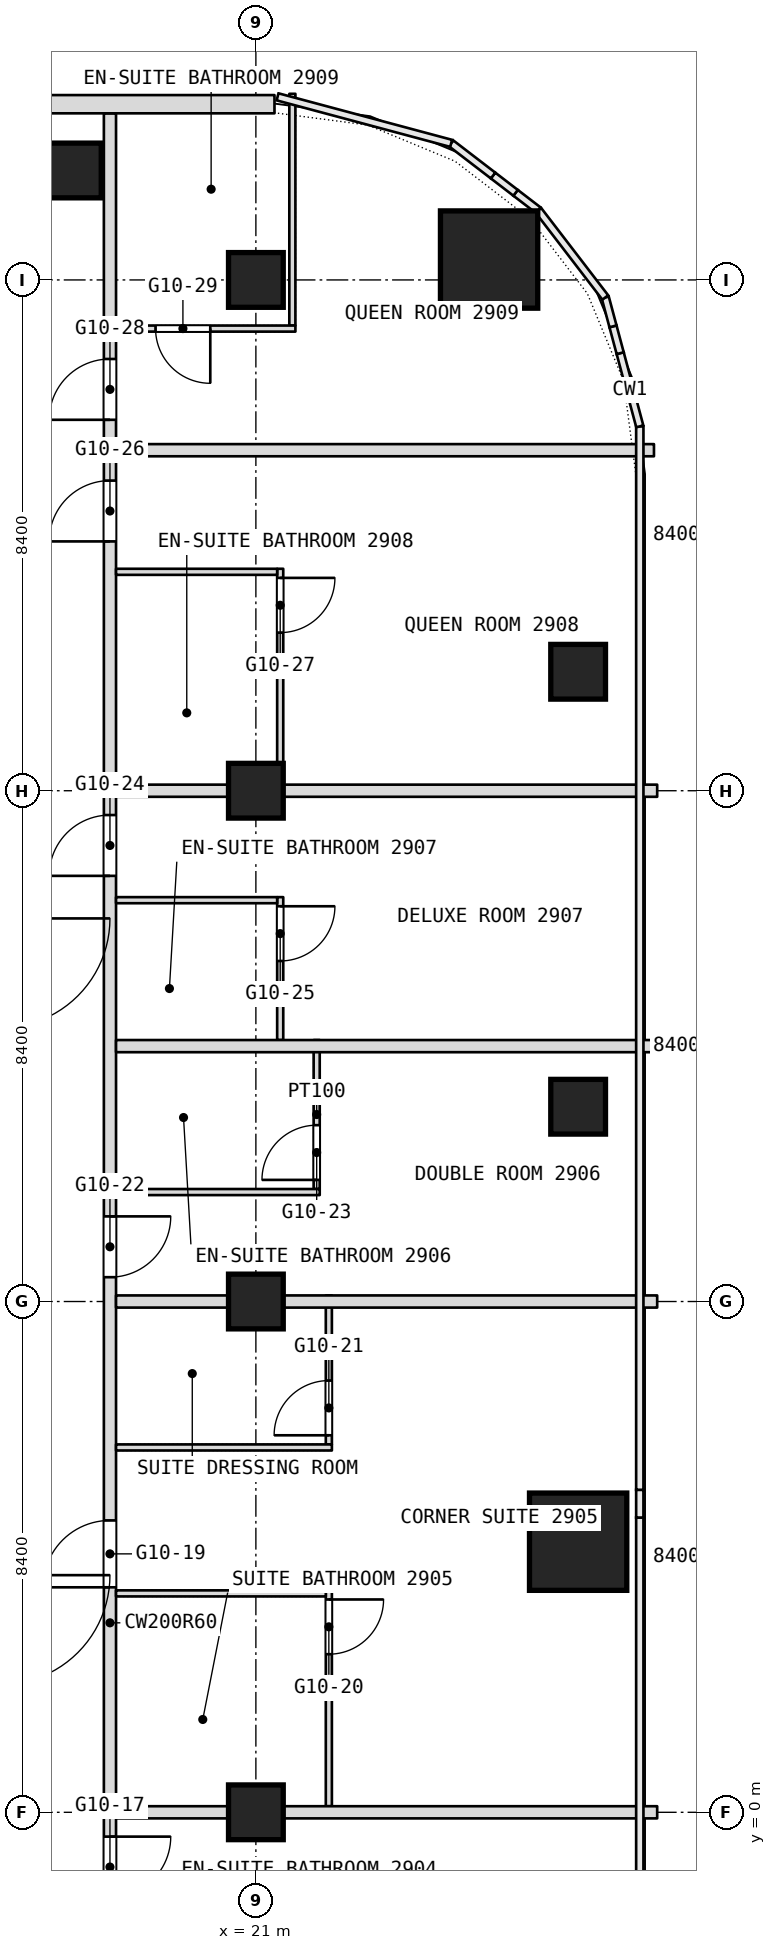
"""IFC4 building model, lengths in metres.
Left out: names, types, materials, properties, quantities, classifications, styles, units other than length and angle.
Written with IfcOpenShell. Run it as: python <this file> out.ifc"""

import sys

from ifc_helpers import new_model, si_unit, direction, frame, frame_2d, origin, origin_2d, place, context, subcontext, project, spatial, rectangle, extrude, element, fill, save


model = new_model("IFC4")
c1 = context("Model", 3, precision=1e-05, world=origin(), true_north=direction((0.0, 1.0)))
c2 = subcontext(c1, "Body", "Model", "MODEL_VIEW")
j1 = project(units=[si_unit("LENGTHUNIT", "METRE"), si_unit("PLANEANGLEUNIT", "RADIAN")], contexts=[c1])
p1 = place(None, origin())
s1 = spatial("IfcSite", under=j1, at=p1, CompositionType="ELEMENT")
p2 = place(p1, origin())
s2 = spatial("IfcBuilding", under=s1, at=p2, CompositionType="ELEMENT")
p3 = place(p2, frame((0.0, 0.0, 130.1)))
s3 = spatial("IfcBuildingStorey", under=s2, at=p3, CompositionType="ELEMENT", Elevation=130.1)
for number, where, z_axis, x_axis in (
    (1, (26.3, 4.45, 0.0), (0.0, 0.0, 1.0), (1.0, 0.0, 0.0)),
    (2, (24.835, 25.535, 0.0), (0.0, 0.0, 1.0), (1.0, 0.0, 0.0)),
):
    element("IfcColumn", number, at=place(p3, frame(where, z_axis=z_axis, x_axis=x_axis)), inside=s3, PredefinedType="COLUMN", context=c2, shape_type="SweptSolid", body=[
        extrude(rectangle(XDim=1.6, YDim=1.6, at=origin_2d()), origin(), (0.0, 0.0, 1.0), 3.6),
    ])
for number, where, z_axis, x_axis in (
    (3, (21.0, 0.0, 0.0), (0.0, 0.0, 1.0), (1.0, 0.0, 0.0)),
    (4, (21.0, 8.4, 0.0), (0.0, 0.0, 1.0), (1.0, 0.0, 0.0)),
    (5, (21.0, 16.8, 0.0), (0.0, 0.0, 1.0), (1.0, 0.0, 0.0)),
    (6, (21.0, 25.2, 0.0), (0.0, 0.0, 1.0), (1.0, 0.0, 0.0)),
    (7, (18.007, 27.0, 0.0), (0.0, 0.0, 1.0), (1.0, 0.0, 0.0)),
    (8, (26.3, 18.756, 0.0), (0.0, 0.0, 1.0), (1.0, 0.0, 0.0)),
    (9, (26.3, 11.603, 0.0), (0.0, 0.0, 1.0), (1.0, 0.0, 0.0)),
):
    element("IfcColumn", number, at=place(p3, frame(where, z_axis=z_axis, x_axis=x_axis)), inside=s3, PredefinedType="COLUMN", context=c2, shape_type="SweptSolid", body=[
        extrude(rectangle(XDim=0.9, YDim=0.9, at=origin_2d()), origin(), (0.0, 0.0, 1.0), 3.6),
    ])
p4 = place(p3, frame((22.2, 0.1, 0.0), z_axis=(0.0, 0.0, 1.0), x_axis=(0.0, 1.0, 0.0)))
e10 = element("IfcWall", 10, at=p4, inside=s3, PredefinedType="PARTITIONING", context=c2, shape_type="SweptSolid", body=[
    extrude(rectangle(XDim=3.55, YDim=0.1, at=frame_2d((1.775, 0.0))), origin(), (0.0, 0.0, 1.0), 3.34),
])
p5 = place(p4, frame((2.5, 0.0, 0.0)))
e11 = element("IfcOpeningElement", 11, at=p5, cuts=e10, PredefinedType="OPENING", context=c2, shape_type="SweptSolid", body=[
    extrude(rectangle(XDim=0.9, YDim=2.1, at=frame_2d((0.45, 1.05))), frame((0.0, 0.05, 0.0), z_axis=(0.0, -1.0, 0.0), x_axis=(1.0, 0.0, 0.0)), (0.0, 0.0, 1.0), 0.1),
])
p6 = place(p3, frame((22.2, 6.05, 0.0), z_axis=(0.0, 0.0, 1.0), x_axis=(0.0, 1.0, 0.0)))
e12 = element("IfcWall", 12, at=p6, inside=s3, PredefinedType="PARTITIONING", context=c2, shape_type="SweptSolid", body=[
    extrude(rectangle(XDim=2.45, YDim=0.1, at=frame_2d((1.225, 0.0))), origin(), (0.0, 0.0, 1.0), 3.34),
])
p7 = place(p6, frame((0.15, 0.0, 0.0)))
e13 = element("IfcOpeningElement", 13, at=p7, cuts=e12, PredefinedType="OPENING", context=c2, shape_type="SweptSolid", body=[
    extrude(rectangle(XDim=0.9, YDim=2.1, at=frame_2d((0.45, 1.05))), frame((0.0, 0.05, 0.0), z_axis=(0.0, -1.0, 0.0), x_axis=(1.0, 0.0, 0.0)), (0.0, 0.0, 1.0), 0.1),
])
p8 = place(p3, frame((22.0, 10.25, 0.0), z_axis=(0.0, 0.0, 1.0), x_axis=(0.0, 1.0, 0.0)))
e14 = element("IfcWall", 14, at=p8, inside=s3, PredefinedType="PARTITIONING", context=c2, shape_type="SweptSolid", body=[
    extrude(rectangle(XDim=2.45, YDim=0.1, at=frame_2d((1.225, 0.0))), origin(), (0.0, 0.0, 1.0), 3.34),
])
p9 = place(p8, frame((0.15, 0.0, 0.0)))
e15 = element("IfcOpeningElement", 15, at=p9, cuts=e14, PredefinedType="OPENING", context=c2, shape_type="SweptSolid", body=[
    extrude(rectangle(XDim=0.9, YDim=2.1, at=frame_2d((0.45, 1.05))), frame((0.0, 0.05, 0.0), z_axis=(0.0, -1.0, 0.0), x_axis=(1.0, 0.0, 0.0)), (0.0, 0.0, 1.0), 0.1),
])
p10 = place(p3, frame((21.6, 24.45, 0.0), z_axis=(0.0, 0.0, 1.0), x_axis=(0.0, 1.0, 0.0)))
e16 = element("IfcWall", 16, at=p10, inside=s3, PredefinedType="PARTITIONING", context=c2, shape_type="SweptSolid", body=[
    extrude(rectangle(XDim=3.811, YDim=0.1, at=frame_2d((1.906, 0.0))), origin(), (0.0, 0.0, 1.0), 3.34),
])
p11 = place(p3, frame((21.4, 12.7, 0.0), z_axis=(0.0, 0.0, 1.0), x_axis=(0.0, 1.0, 0.0)))
e17 = element("IfcWall", 17, at=p11, inside=s3, PredefinedType="PARTITIONING", context=c2, shape_type="SweptSolid", body=[
    extrude(rectangle(XDim=2.35, YDim=0.1, at=frame_2d((1.175, 0.0))), origin(), (0.0, 0.0, 1.0), 3.34),
])
p12 = place(p11, frame((1.3, 0.0, 0.0)))
e18 = element("IfcOpeningElement", 18, at=p12, cuts=e17, PredefinedType="OPENING", context=c2, shape_type="SweptSolid", body=[
    extrude(rectangle(XDim=0.9, YDim=2.1, at=frame_2d((0.45, 1.05))), frame((0.0, 0.05, 0.0), z_axis=(0.0, -1.0, 0.0), x_axis=(1.0, 0.0, 0.0)), (0.0, 0.0, 1.0), 0.1),
])
p13 = place(p3, frame((21.4, 16.9, 0.0), z_axis=(0.0, 0.0, 1.0), x_axis=(0.0, 1.0, 0.0)))
e19 = element("IfcWall", 19, at=p13, inside=s3, PredefinedType="PARTITIONING", context=c2, shape_type="SweptSolid", body=[
    extrude(rectangle(XDim=3.55, YDim=0.1, at=frame_2d((1.775, 0.0))), origin(), (0.0, 0.0, 1.0), 3.34),
])
p14 = place(p13, frame((2.5, 0.0, 0.0)))
e20 = element("IfcOpeningElement", 20, at=p14, cuts=e19, PredefinedType="OPENING", context=c2, shape_type="SweptSolid", body=[
    extrude(rectangle(XDim=0.9, YDim=2.1, at=frame_2d((0.45, 1.05))), frame((0.0, 0.05, 0.0), z_axis=(0.0, -1.0, 0.0), x_axis=(1.0, 0.0, 0.0)), (0.0, 0.0, 1.0), 0.1),
])
p15 = place(p3, frame((18.6, -21.708, 0.0), z_axis=(0.0, 0.0, 1.0), x_axis=(0.0, 1.0, 0.0)))
e21 = element("IfcWall", 21, at=p15, inside=s3, PredefinedType="PARTITIONING", context=c2, shape_type="SweptSolid", body=[
    extrude(rectangle(XDim=49.648, YDim=0.2, at=frame_2d((24.824, 0.0))), origin(), (0.0, 0.0, 1.0), 3.34),
])
p16 = place(p15, frame((2.204, 0.0, 0.0)))
e22 = element("IfcOpeningElement", 22, at=p16, cuts=e21, PredefinedType="OPENING", context=c2, shape_type="SweptSolid", body=[
    extrude(rectangle(XDim=0.9, YDim=2.1, at=frame_2d((0.45, 1.05))), frame((0.0, 0.1, 0.0), z_axis=(0.0, -1.0, 0.0), x_axis=(1.0, 0.0, 0.0)), (0.0, 0.0, 1.0), 0.2),
])
p17 = place(p15, frame((10.658, 0.0, 0.0)))
e23 = element("IfcOpeningElement", 23, at=p17, cuts=e21, PredefinedType="OPENING", context=c2, shape_type="SweptSolid", body=[
    extrude(rectangle(XDim=1.1, YDim=2.1, at=frame_2d((0.55, 1.05))), frame((0.0, 0.1, 0.0), z_axis=(0.0, -1.0, 0.0), x_axis=(1.0, 0.0, 0.0)), (0.0, 0.0, 1.0), 0.2),
])
p18 = place(p15, frame((13.708, 0.0, 0.0)))
e24 = element("IfcOpeningElement", 24, at=p18, cuts=e21, PredefinedType="OPENING", context=c2, shape_type="SweptSolid", body=[
    extrude(rectangle(XDim=1.0, YDim=2.1, at=frame_2d((0.5, 1.05))), frame((0.0, 0.1, 0.0), z_axis=(0.0, -1.0, 0.0), x_axis=(1.0, 0.0, 0.0)), (0.0, 0.0, 1.0), 0.2),
])
p19 = place(p15, frame((20.308, 0.0, 0.0)))
e25 = element("IfcOpeningElement", 25, at=p19, cuts=e21, PredefinedType="OPENING", context=c2, shape_type="SweptSolid", body=[
    extrude(rectangle(XDim=1.0, YDim=2.1, at=frame_2d((0.5, 1.05))), frame((0.0, 0.1, 0.0), z_axis=(0.0, -1.0, 0.0), x_axis=(1.0, 0.0, 0.0)), (0.0, 0.0, 1.0), 0.2),
])
p20 = place(p15, frame((25.408, 0.0, 0.0)))
e26 = element("IfcOpeningElement", 26, at=p20, cuts=e21, PredefinedType="OPENING", context=c2, shape_type="SweptSolid", body=[
    extrude(rectangle(XDim=1.1, YDim=2.1, at=frame_2d((0.55, 1.05))), frame((0.0, 0.1, 0.0), z_axis=(0.0, -1.0, 0.0), x_axis=(1.0, 0.0, 0.0)), (0.0, 0.0, 1.0), 0.2),
])
p21 = place(p15, frame((30.508, 0.0, 0.0)))
e27 = element("IfcOpeningElement", 27, at=p21, cuts=e21, PredefinedType="OPENING", context=c2, shape_type="SweptSolid", body=[
    extrude(rectangle(XDim=1.0, YDim=2.1, at=frame_2d((0.5, 1.05))), frame((0.0, 0.1, 0.0), z_axis=(0.0, -1.0, 0.0), x_axis=(1.0, 0.0, 0.0)), (0.0, 0.0, 1.0), 0.2),
])
p22 = place(p15, frame((37.108, 0.0, 0.0)))
e28 = element("IfcOpeningElement", 28, at=p22, cuts=e21, PredefinedType="OPENING", context=c2, shape_type="SweptSolid", body=[
    extrude(rectangle(XDim=1.0, YDim=2.1, at=frame_2d((0.5, 1.05))), frame((0.0, 0.1, 0.0), z_axis=(0.0, -1.0, 0.0), x_axis=(1.0, 0.0, 0.0)), (0.0, 0.0, 1.0), 0.2),
])
p23 = place(p15, frame((42.608, 0.0, 0.0)))
e29 = element("IfcOpeningElement", 29, at=p23, cuts=e21, PredefinedType="OPENING", context=c2, shape_type="SweptSolid", body=[
    extrude(rectangle(XDim=1.0, YDim=2.1, at=frame_2d((0.5, 1.05))), frame((0.0, 0.1, 0.0), z_axis=(0.0, -1.0, 0.0), x_axis=(1.0, 0.0, 0.0)), (0.0, 0.0, 1.0), 0.2),
])
p24 = place(p15, frame((44.608, 0.0, 0.0)))
e30 = element("IfcOpeningElement", 30, at=p24, cuts=e21, PredefinedType="OPENING", context=c2, shape_type="SweptSolid", body=[
    extrude(rectangle(XDim=1.0, YDim=2.1, at=frame_2d((0.5, 1.05))), frame((0.0, 0.1, 0.0), z_axis=(0.0, -1.0, 0.0), x_axis=(1.0, 0.0, 0.0)), (0.0, 0.0, 1.0), 0.2),
])
p25 = place(p3, frame((18.7, 0.0, 0.0), z_axis=(0.0, 0.0, 1.0), x_axis=(1.0, 0.0, 0.0)))
e31 = element("IfcWall", 31, at=p25, inside=s3, PredefinedType="PARTITIONING", context=c2, shape_type="SweptSolid", body=[
    extrude(rectangle(XDim=8.9, YDim=0.2, at=frame_2d((4.45, 0.0))), origin(), (0.0, 0.0, 1.0), 2.89),
])
p26 = place(p3, frame((18.7, 3.6, 0.0), z_axis=(0.0, 0.0, 1.0), x_axis=(1.0, 0.0, 0.0)))
e32 = element("IfcWall", 32, at=p26, inside=s3, PredefinedType="PARTITIONING", context=c2, shape_type="SweptSolid", body=[
    extrude(rectangle(XDim=3.45, YDim=0.1, at=frame_2d((1.725, 0.0))), origin(), (0.0, 0.0, 1.0), 3.34),
])
p27 = place(p3, frame((18.7, 6.0, 0.0), z_axis=(0.0, 0.0, 1.0), x_axis=(1.0, 0.0, 0.0)))
e33 = element("IfcWall", 33, at=p27, inside=s3, PredefinedType="PARTITIONING", context=c2, shape_type="SweptSolid", body=[
    extrude(rectangle(XDim=3.55, YDim=0.1, at=frame_2d((1.775, 0.0))), origin(), (0.0, 0.0, 1.0), 3.34),
])
p28 = place(p3, frame((18.7, 8.4, 0.0), z_axis=(0.0, 0.0, 1.0), x_axis=(1.0, 0.0, 0.0)))
e34 = element("IfcWall", 34, at=p28, inside=s3, PredefinedType="PARTITIONING", context=c2, shape_type="SweptSolid", body=[
    extrude(rectangle(XDim=8.9, YDim=0.2, at=frame_2d((4.45, 0.0))), origin(), (0.0, 0.0, 1.0), 2.89),
])
p29 = place(p3, frame((18.7, 10.2, 0.0), z_axis=(0.0, 0.0, 1.0), x_axis=(1.0, 0.0, 0.0)))
e35 = element("IfcWall", 35, at=p29, inside=s3, PredefinedType="PARTITIONING", context=c2, shape_type="SweptSolid", body=[
    extrude(rectangle(XDim=3.35, YDim=0.1, at=frame_2d((1.675, 0.0))), origin(), (0.0, 0.0, 1.0), 3.34),
])
p30 = place(p3, frame((18.7, 12.6, 0.0), z_axis=(0.0, 0.0, 1.0), x_axis=(1.0, 0.0, 0.0)))
e36 = element("IfcWall", 36, at=p30, inside=s3, PredefinedType="PARTITIONING", context=c2, shape_type="SweptSolid", body=[
    extrude(rectangle(XDim=8.9, YDim=0.2, at=frame_2d((4.45, 0.0))), origin(), (0.0, 0.0, 1.0), 3.34),
])
p31 = place(p3, frame((18.7, 15.0, 0.0), z_axis=(0.0, 0.0, 1.0), x_axis=(1.0, 0.0, 0.0)))
e37 = element("IfcWall", 37, at=p31, inside=s3, PredefinedType="PARTITIONING", context=c2, shape_type="SweptSolid", body=[
    extrude(rectangle(XDim=2.65, YDim=0.1, at=frame_2d((1.325, 0.0))), origin(), (0.0, 0.0, 1.0), 3.34),
])
p32 = place(p3, frame((18.7, 16.8, 0.0), z_axis=(0.0, 0.0, 1.0), x_axis=(1.0, 0.0, 0.0)))
e38 = element("IfcWall", 38, at=p32, inside=s3, PredefinedType="PARTITIONING", context=c2, shape_type="SweptSolid", body=[
    extrude(rectangle(XDim=8.9, YDim=0.2, at=frame_2d((4.45, 0.0))), origin(), (0.0, 0.0, 1.0), 2.89),
])
p33 = place(p3, frame((18.7, 20.4, 0.0), z_axis=(0.0, 0.0, 1.0), x_axis=(1.0, 0.0, 0.0)))
e39 = element("IfcWall", 39, at=p33, inside=s3, PredefinedType="PARTITIONING", context=c2, shape_type="SweptSolid", body=[
    extrude(rectangle(XDim=2.65, YDim=0.1, at=frame_2d((1.325, 0.0))), origin(), (0.0, 0.0, 1.0), 3.34),
])
p34 = place(p3, frame((18.7, 22.4, 0.0), z_axis=(0.0, 0.0, 1.0), x_axis=(1.0, 0.0, 0.0)))
e40 = element("IfcWall", 40, at=p34, inside=s3, PredefinedType="PARTITIONING", context=c2, shape_type="SweptSolid", body=[
    extrude(rectangle(XDim=8.847, YDim=0.2, at=frame_2d((4.424, 0.0))), origin(), (0.0, 0.0, 1.0), 3.34),
])
p35 = place(p3, frame((18.7, 24.4, 0.0), z_axis=(0.0, 0.0, 1.0), x_axis=(1.0, 0.0, 0.0)))
e41 = element("IfcWall", 41, at=p35, inside=s3, PredefinedType="PARTITIONING", context=c2, shape_type="SweptSolid", body=[
    extrude(rectangle(XDim=2.95, YDim=0.1, at=frame_2d((1.475, 0.0))), origin(), (0.0, 0.0, 1.0), 3.34),
])
p36 = place(p35, frame((0.65, 0.0, 0.0)))
e42 = element("IfcOpeningElement", 42, at=p36, cuts=e41, PredefinedType="OPENING", context=c2, shape_type="SweptSolid", body=[
    extrude(rectangle(XDim=0.9, YDim=2.1, at=frame_2d((0.45, 1.05))), frame((0.0, 0.05, 0.0), z_axis=(0.0, -1.0, 0.0), x_axis=(1.0, 0.0, 0.0)), (0.0, 0.0, 1.0), 0.1),
])
p37 = place(p3, frame((21.306, 28.09, 0.0), z_axis=(0.0, 0.0, 1.0), x_axis=(-1.0, 0.0, 0.0)))
e43 = element("IfcWall", 43, at=p37, inside=s3, PredefinedType="NOTDEFINED", context=c2, shape_type="SweptSolid", body=[
    extrude(rectangle(XDim=42.612, YDim=0.3, at=frame_2d((21.306, 0.0))), origin(), (0.0, 0.0, 1.0), 3.6),
])
p38 = place(p37, frame((5.406, 0.0, 0.9)))
e44 = element("IfcOpeningElement", 44, at=p38, cuts=e43, PredefinedType="OPENING", context=c2, shape_type="SweptSolid", body=[
    extrude(rectangle(XDim=2.4, YDim=2.1, at=frame_2d((1.2, 1.05))), frame((0.0, 0.15, 0.0), z_axis=(0.0, -1.0, 0.0), x_axis=(1.0, 0.0, 0.0)), (0.0, 0.0, 1.0), 0.3),
])
p39 = place(p37, frame((9.606, 0.0, 0.9)))
e45 = element("IfcOpeningElement", 45, at=p39, cuts=e43, PredefinedType="OPENING", context=c2, shape_type="SweptSolid", body=[
    extrude(rectangle(XDim=2.4, YDim=2.1, at=frame_2d((1.2, 1.05))), frame((0.0, 0.15, 0.0), z_axis=(0.0, -1.0, 0.0), x_axis=(1.0, 0.0, 0.0)), (0.0, 0.0, 1.0), 0.3),
])
p40 = place(p37, frame((13.806, 0.0, 0.9)))
e46 = element("IfcOpeningElement", 46, at=p40, cuts=e43, PredefinedType="OPENING", context=c2, shape_type="SweptSolid", body=[
    extrude(rectangle(XDim=2.4, YDim=2.1, at=frame_2d((1.2, 1.05))), frame((0.0, 0.15, 0.0), z_axis=(0.0, -1.0, 0.0), x_axis=(1.0, 0.0, 0.0)), (0.0, 0.0, 1.0), 0.3),
])
p41 = place(p37, frame((18.006, 0.0, 0.9)))
e47 = element("IfcOpeningElement", 47, at=p41, cuts=e43, PredefinedType="OPENING", context=c2, shape_type="SweptSolid", body=[
    extrude(rectangle(XDim=2.4, YDim=2.1, at=frame_2d((1.2, 1.05))), frame((0.0, 0.15, 0.0), z_axis=(0.0, -1.0, 0.0), x_axis=(1.0, 0.0, 0.0)), (0.0, 0.0, 1.0), 0.3),
])
p42 = place(p37, frame((22.206, 0.0, 0.9)))
e48 = element("IfcOpeningElement", 48, at=p42, cuts=e43, PredefinedType="OPENING", context=c2, shape_type="SweptSolid", body=[
    extrude(rectangle(XDim=2.4, YDim=2.1, at=frame_2d((1.2, 1.05))), frame((0.0, 0.15, 0.0), z_axis=(0.0, -1.0, 0.0), x_axis=(1.0, 0.0, 0.0)), (0.0, 0.0, 1.0), 0.3),
])
p43 = place(p37, frame((26.406, 0.0, 0.9)))
e49 = element("IfcOpeningElement", 49, at=p43, cuts=e43, PredefinedType="OPENING", context=c2, shape_type="SweptSolid", body=[
    extrude(rectangle(XDim=2.4, YDim=2.1, at=frame_2d((1.2, 1.05))), frame((0.0, 0.15, 0.0), z_axis=(0.0, -1.0, 0.0), x_axis=(1.0, 0.0, 0.0)), (0.0, 0.0, 1.0), 0.3),
])
p44 = place(p37, frame((30.606, 0.0, 0.9)))
e50 = element("IfcOpeningElement", 50, at=p44, cuts=e43, PredefinedType="OPENING", context=c2, shape_type="SweptSolid", body=[
    extrude(rectangle(XDim=2.4, YDim=2.1, at=frame_2d((1.2, 1.05))), frame((0.0, 0.15, 0.0), z_axis=(0.0, -1.0, 0.0), x_axis=(1.0, 0.0, 0.0)), (0.0, 0.0, 1.0), 0.3),
])
p45 = place(p37, frame((34.806, 0.0, 0.9)))
e51 = element("IfcOpeningElement", 51, at=p45, cuts=e43, PredefinedType="OPENING", context=c2, shape_type="SweptSolid", body=[
    extrude(rectangle(XDim=2.4, YDim=2.1, at=frame_2d((1.2, 1.05))), frame((0.0, 0.15, 0.0), z_axis=(0.0, -1.0, 0.0), x_axis=(1.0, 0.0, 0.0)), (0.0, 0.0, 1.0), 0.3),
])
p46 = place(p5, origin())
e52 = element("IfcDoor", 52, at=p46, inside=s3, OperationType="SINGLE_SWING_RIGHT", PredefinedType="DOOR", context=c2, shape_type="SweptSolid", body=[
    extrude(rectangle(XDim=0.9, YDim=2.1, at=frame_2d((0.45, 1.05))), frame((0.0, 0.025, 0.0), z_axis=(0.0, -1.0, 0.0), x_axis=(1.0, 0.0, 0.0)), (0.0, 0.0, 1.0), 0.05),
])
fill(e11, e52)
p47 = place(p7, origin())
e53 = element("IfcDoor", 53, at=p47, inside=s3, OperationType="SINGLE_SWING_LEFT", PredefinedType="DOOR", context=c2, shape_type="SweptSolid", body=[
    extrude(rectangle(XDim=0.9, YDim=2.1, at=frame_2d((0.45, 1.05))), frame((0.0, 0.025, 0.0), z_axis=(0.0, -1.0, 0.0), x_axis=(1.0, 0.0, 0.0)), (0.0, 0.0, 1.0), 0.05),
])
fill(e13, e53)
p48 = place(p9, origin())
e54 = element("IfcDoor", 54, at=p48, inside=s3, OperationType="SINGLE_SWING_LEFT", PredefinedType="DOOR", context=c2, shape_type="SweptSolid", body=[
    extrude(rectangle(XDim=0.9, YDim=2.1, at=frame_2d((0.45, 1.05))), frame((0.0, 0.025, 0.0), z_axis=(0.0, -1.0, 0.0), x_axis=(1.0, 0.0, 0.0)), (0.0, 0.0, 1.0), 0.05),
])
fill(e15, e54)
p49 = place(p12, origin())
e55 = element("IfcDoor", 55, at=p49, inside=s3, OperationType="SINGLE_SWING_RIGHT", PredefinedType="DOOR", context=c2, shape_type="SweptSolid", body=[
    extrude(rectangle(XDim=0.9, YDim=2.1, at=frame_2d((0.45, 1.05))), frame((0.0, 0.025, 0.0), z_axis=(0.0, -1.0, 0.0), x_axis=(1.0, 0.0, 0.0)), (0.0, 0.0, 1.0), 0.05),
])
fill(e18, e55)
p50 = place(p14, origin())
e56 = element("IfcDoor", 56, at=p50, inside=s3, OperationType="SINGLE_SWING_RIGHT", PredefinedType="DOOR", context=c2, shape_type="SweptSolid", body=[
    extrude(rectangle(XDim=0.9, YDim=2.1, at=frame_2d((0.45, 1.05))), frame((0.0, 0.025, 0.0), z_axis=(0.0, -1.0, 0.0), x_axis=(1.0, 0.0, 0.0)), (0.0, 0.0, 1.0), 0.05),
])
fill(e20, e56)
p51 = place(p19, origin())
e57 = element("IfcDoor", 57, at=p51, inside=s3, OperationType="SINGLE_SWING_LEFT", PredefinedType="DOOR", context=c2, shape_type="SweptSolid", body=[
    extrude(rectangle(XDim=1.0, YDim=2.1, at=frame_2d((0.5, 1.05))), frame((0.0, 0.025, 0.0), z_axis=(0.0, -1.0, 0.0), x_axis=(1.0, 0.0, 0.0)), (0.0, 0.0, 1.0), 0.05),
])
fill(e25, e57)
p52 = place(p20, origin())
e58 = element("IfcDoor", 58, at=p52, inside=s3, OperationType="SINGLE_SWING_RIGHT", PredefinedType="DOOR", context=c2, shape_type="SweptSolid", body=[
    extrude(rectangle(XDim=1.1, YDim=2.1, at=frame_2d((0.55, 1.05))), frame((0.0, 0.025, 0.0), z_axis=(0.0, -1.0, 0.0), x_axis=(1.0, 0.0, 0.0)), (0.0, 0.0, 1.0), 0.05),
])
fill(e26, e58)
p53 = place(p21, origin())
e59 = element("IfcDoor", 59, at=p53, inside=s3, OperationType="SINGLE_SWING_RIGHT", PredefinedType="DOOR", context=c2, shape_type="SweptSolid", body=[
    extrude(rectangle(XDim=1.0, YDim=2.1, at=frame_2d((0.5, 1.05))), frame((0.0, 0.025, 0.0), z_axis=(0.0, -1.0, 0.0), x_axis=(1.0, 0.0, 0.0)), (0.0, 0.0, 1.0), 0.05),
])
fill(e27, e59)
p54 = place(p22, origin())
e60 = element("IfcDoor", 60, at=p54, inside=s3, OperationType="SINGLE_SWING_RIGHT", PredefinedType="DOOR", context=c2, shape_type="SweptSolid", body=[
    extrude(rectangle(XDim=1.0, YDim=2.1, at=frame_2d((0.5, 1.05))), frame((0.0, 0.025, 0.0), z_axis=(0.0, -1.0, 0.0), x_axis=(1.0, 0.0, 0.0)), (0.0, 0.0, 1.0), 0.05),
])
fill(e28, e60)
p55 = place(p23, origin())
e61 = element("IfcDoor", 61, at=p55, inside=s3, OperationType="SINGLE_SWING_RIGHT", PredefinedType="DOOR", context=c2, shape_type="SweptSolid", body=[
    extrude(rectangle(XDim=1.0, YDim=2.1, at=frame_2d((0.5, 1.05))), frame((0.0, 0.025, 0.0), z_axis=(0.0, -1.0, 0.0), x_axis=(1.0, 0.0, 0.0)), (0.0, 0.0, 1.0), 0.05),
])
fill(e29, e61)
p56 = place(p24, origin())
e62 = element("IfcDoor", 62, at=p56, inside=s3, OperationType="SINGLE_SWING_RIGHT", PredefinedType="DOOR", context=c2, shape_type="SweptSolid", body=[
    extrude(rectangle(XDim=1.0, YDim=2.1, at=frame_2d((0.5, 1.05))), frame((0.0, 0.025, 0.0), z_axis=(0.0, -1.0, 0.0), x_axis=(1.0, 0.0, 0.0)), (0.0, 0.0, 1.0), 0.05),
])
fill(e30, e62)
p57 = place(p36, origin())
e63 = element("IfcDoor", 63, at=p57, inside=s3, OperationType="SINGLE_SWING_RIGHT", PredefinedType="DOOR", context=c2, shape_type="SweptSolid", body=[
    extrude(rectangle(XDim=0.9, YDim=2.1, at=frame_2d((0.45, 1.05))), frame((0.0, 0.025, 0.0), z_axis=(0.0, -1.0, 0.0), x_axis=(1.0, 0.0, 0.0)), (0.0, 0.0, 1.0), 0.05),
])
fill(e42, e63)
save(model, sys.argv[1])
